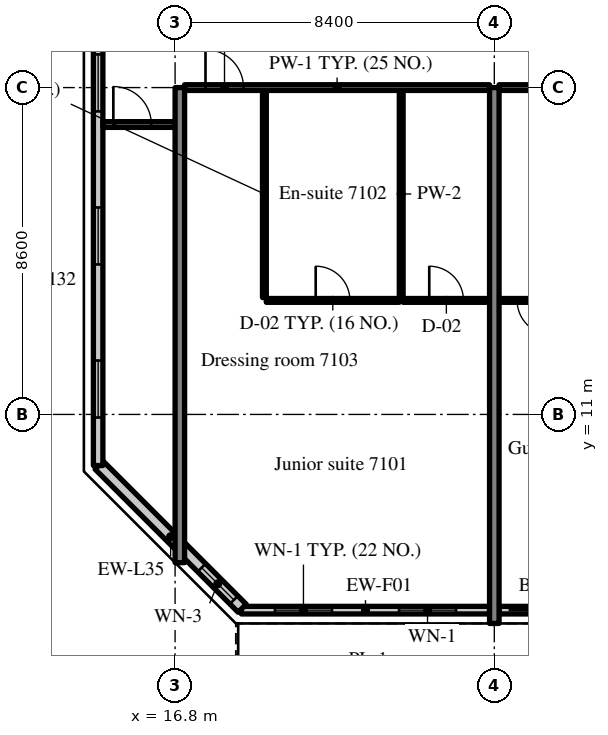
"""IFC4 building model, lengths in metres.
Left out: names, types, materials, properties, quantities, classifications, styles, units other than length and angle.
Written with IfcOpenShell. Run it as: python <this file> out.ifc"""

import sys

from ifc_helpers import new_model, si_unit, direction, frame, frame_2d, origin, place, context, subcontext, project, spatial, rectangle, extrude, source, transform, mapped, element, fill, save


model = new_model("IFC4")
c1 = context("Model", 3, precision=1e-05, world=origin(), true_north=direction((0.0, 1.0)))
c2 = subcontext(c1, "Body", "Model", "MODEL_VIEW")
j1 = project(units=[si_unit("LENGTHUNIT", "METRE"), si_unit("PLANEANGLEUNIT", "RADIAN")], contexts=[c1])
p1 = place(None, origin())
s1 = spatial("IfcSite", under=j1, at=p1, CompositionType="ELEMENT")
p2 = place(p1, origin())
s2 = spatial("IfcBuilding", under=s1, at=p2, CompositionType="ELEMENT")
p3 = place(p2, frame((0.0, 0.0, 297.7)))
s3 = spatial("IfcBuildingStorey", under=s2, at=p3, CompositionType="ELEMENT", Elevation=297.7)
m1 = source(origin(), c2, "Body", "SweptSolid", [
    extrude(rectangle(XDim=12.5, YDim=0.25, at=frame_2d((6.25, 0.0))), origin(), (0.0, 0.0, 1.0), 3.72),
])
p4 = place(p3, frame((16.925, 7.1, 0.0), z_axis=(0.0, 0.0, 1.0), x_axis=(0.0, 1.0, 0.0)))
e1 = element("IfcWall", 1, at=p4, inside=s3, PredefinedType="SHEAR", context=c2, shape_type="MappedRepresentation", body=[
    mapped(m1, transform((0.0, 0.0, 0.0), scale=1.0)),
])
m2 = source(origin(), c2, "Body", "SweptSolid", [
    extrude(rectangle(XDim=14.1, YDim=0.25, at=frame_2d((7.05, 0.0))), origin(), (0.0, 0.0, 1.0), 3.72),
])
p5 = place(p3, frame((25.2, 5.5, 0.0), z_axis=(0.0, 0.0, 1.0), x_axis=(0.0, 1.0, 0.0)))
e2 = element("IfcWall", 2, at=p5, inside=s3, PredefinedType="SHEAR", context=c2, shape_type="MappedRepresentation", body=[
    mapped(m2, transform((0.0, 0.0, 0.0), scale=1.0)),
])
m3 = source(origin(), c2, "Body", "SweptSolid", [
    extrude(rectangle(XDim=6.53, YDim=0.2, at=frame_2d((3.265, 0.0))), origin(), (0.0, 0.0, 1.0), 3.17),
])
p6 = place(p3, frame((18.545, 5.85, 0.0), z_axis=(0.0, 0.0, 1.0), x_axis=(1.0, 0.0, 0.0)))
e3 = element("IfcWall", 3, at=p6, inside=s3, PredefinedType="SOLIDWALL", context=c2, shape_type="MappedRepresentation", body=[
    mapped(m3, transform((0.0, 0.0, 0.0), scale=1.0)),
])
m4 = source(origin(), c2, "Body", "SweptSolid", [
    extrude(rectangle(XDim=1.5, YDim=1.5, at=frame_2d((0.75, 0.75))), frame((0.0, 0.11, 0.0), z_axis=(0.0, -1.0, 0.0), x_axis=(1.0, 0.0, 0.0)), (0.0, 0.0, 1.0), 0.22),
])
p7 = place(p6, frame((0.883, 0.0, 0.9)))
e4 = element("IfcOpeningElement", 4, at=p7, cuts=e3, PredefinedType="OPENING", context=c2, shape_type="MappedRepresentation", body=[
    mapped(m4, transform((0.0, 0.0, 0.0), scale=1.0)),
])
p8 = place(p6, frame((4.147, 0.0, 0.9)))
e5 = element("IfcOpeningElement", 5, at=p8, cuts=e3, PredefinedType="OPENING", context=c2, shape_type="MappedRepresentation", body=[
    mapped(m4, transform((0.0, 0.0, 0.0), scale=1.0)),
])
m5 = source(origin(), c2, "Body", "SweptSolid", [
    extrude(rectangle(XDim=8.15, YDim=0.2, at=frame_2d((4.075, 0.0))), origin(), (0.0, 0.0, 1.0), 3.17),
])
p9 = place(p3, frame((25.325, 5.85, 0.0), z_axis=(0.0, 0.0, 1.0), x_axis=(1.0, 0.0, 0.0)))
e6 = element("IfcWall", 6, at=p9, inside=s3, PredefinedType="SOLIDWALL", context=c2, shape_type="MappedRepresentation", body=[
    mapped(m5, transform((0.0, 0.0, 0.0), scale=1.0)),
])
m6 = source(origin(), c2, "Body", "SweptSolid", [
    extrude(rectangle(XDim=1.2, YDim=2.4, at=frame_2d((0.6, 1.2))), frame((0.0, 0.11, 0.0), z_axis=(0.0, -1.0, 0.0), x_axis=(1.0, 0.0, 0.0)), (0.0, 0.0, 1.0), 0.22),
])
p10 = place(p9, frame((0.25, 0.0, 0.0)))
e7 = element("IfcOpeningElement", 7, at=p10, cuts=e6, PredefinedType="OPENING", context=c2, shape_type="MappedRepresentation", body=[
    mapped(m6, transform((0.0, 0.0, 0.0), scale=1.0)),
])
p11 = place(p9, frame((2.325, 0.0, 0.9)))
e8 = element("IfcOpeningElement", 8, at=p11, cuts=e6, PredefinedType="OPENING", context=c2, shape_type="MappedRepresentation", body=[
    mapped(m4, transform((0.0, 0.0, 0.0), scale=1.0)),
])
p12 = place(p9, frame((4.325, 0.0, 0.0)))
e9 = element("IfcOpeningElement", 9, at=p12, cuts=e6, PredefinedType="OPENING", context=c2, shape_type="MappedRepresentation", body=[
    mapped(m6, transform((0.0, 0.0, 0.0), scale=1.0)),
])
p13 = place(p9, frame((6.4, 0.0, 0.9)))
e10 = element("IfcOpeningElement", 10, at=p13, cuts=e6, PredefinedType="OPENING", context=c2, shape_type="MappedRepresentation", body=[
    mapped(m4, transform((0.0, 0.0, 0.0), scale=1.0)),
])
m7 = source(origin(), c2, "Body", "SweptSolid", [
    extrude(rectangle(XDim=5.326, YDim=0.3, at=frame_2d((2.663, 0.0))), origin(), (0.0, 0.0, 1.0), 3.72),
])
p14 = place(p3, frame((14.8, 9.666, 0.0), z_axis=(0.0, 0.0, 1.0), x_axis=(0.707083859269, -0.707129702361, 0.0)))
e11 = element("IfcWall", 11, at=p14, inside=s3, PredefinedType="SOLIDWALL", context=c2, shape_type="MappedRepresentation", body=[
    mapped(m7, transform((0.0, 0.0, 0.0), scale=1.0)),
])
m8 = source(origin(), c2, "Body", "SweptSolid", [
    extrude(rectangle(XDim=1.2, YDim=1.5, at=frame_2d((0.6, 0.75))), frame((0.0, 0.16, 0.0), z_axis=(0.0, -1.0, 0.0), x_axis=(1.0, 0.0, 0.0)), (0.0, 0.0, 1.0), 0.32),
])
p15 = place(p14, frame((3.815, 0.0, 0.9)))
e12 = element("IfcOpeningElement", 12, at=p15, cuts=e11, PredefinedType="OPENING", context=c2, shape_type="MappedRepresentation", body=[
    mapped(m8, transform((0.0, 0.0, 0.0), scale=1.0)),
])
m9 = source(origin(), c2, "Body", "SweptSolid", [
    extrude(rectangle(XDim=28.189, YDim=0.25, at=frame_2d((14.095, 0.0))), origin(), (0.0, 0.0, 1.0), 3.72),
])
p16 = place(p3, frame((14.775, 37.845, 0.0), z_axis=(0.0, 0.0, 1.0), x_axis=(0.0, -1.0, 0.0)))
e13 = element("IfcWall", 13, at=p16, inside=s3, PredefinedType="SOLIDWALL", context=c2, shape_type="MappedRepresentation", body=[
    mapped(m9, transform((0.0, 0.0, 0.0), scale=1.0)),
])
m10 = source(origin(), c2, "Body", "SweptSolid", [
    extrude(rectangle(XDim=1.5, YDim=1.5, at=frame_2d((0.75, 0.75))), frame((0.0, 0.135, 0.0), z_axis=(0.0, -1.0, 0.0), x_axis=(1.0, 0.0, 0.0)), (0.0, 0.0, 1.0), 0.27),
])
p17 = place(p16, frame((1.263, 0.0, 0.9)))
e14 = element("IfcOpeningElement", 14, at=p17, cuts=e13, PredefinedType="OPENING", context=c2, shape_type="MappedRepresentation", body=[
    mapped(m10, transform((0.0, 0.0, 0.0), scale=1.0)),
])
p18 = place(p16, frame((5.291, 0.0, 0.9)))
e15 = element("IfcOpeningElement", 15, at=p18, cuts=e13, PredefinedType="OPENING", context=c2, shape_type="MappedRepresentation", body=[
    mapped(m10, transform((0.0, 0.0, 0.0), scale=1.0)),
])
p19 = place(p16, frame((9.318, 0.0, 0.9)))
e16 = element("IfcOpeningElement", 16, at=p19, cuts=e13, PredefinedType="OPENING", context=c2, shape_type="MappedRepresentation", body=[
    mapped(m10, transform((0.0, 0.0, 0.0), scale=1.0)),
])
p20 = place(p16, frame((13.345, 0.0, 0.9)))
e17 = element("IfcOpeningElement", 17, at=p20, cuts=e13, PredefinedType="OPENING", context=c2, shape_type="MappedRepresentation", body=[
    mapped(m10, transform((0.0, 0.0, 0.0), scale=1.0)),
])
p21 = place(p16, frame((17.372, 0.0, 0.9)))
e18 = element("IfcOpeningElement", 18, at=p21, cuts=e13, PredefinedType="OPENING", context=c2, shape_type="MappedRepresentation", body=[
    mapped(m10, transform((0.0, 0.0, 0.0), scale=1.0)),
])
p22 = place(p16, frame((21.399, 0.0, 0.9)))
e19 = element("IfcOpeningElement", 19, at=p22, cuts=e13, PredefinedType="OPENING", context=c2, shape_type="MappedRepresentation", body=[
    mapped(m10, transform((0.0, 0.0, 0.0), scale=1.0)),
])
p23 = place(p16, frame((25.426, 0.0, 0.9)))
e20 = element("IfcOpeningElement", 20, at=p23, cuts=e13, PredefinedType="OPENING", context=c2, shape_type="MappedRepresentation", body=[
    mapped(m10, transform((0.0, 0.0, 0.0), scale=1.0)),
])
m11 = source(origin(), c2, "Body", "SweptSolid", [
    extrude(rectangle(XDim=5.45, YDim=0.1, at=frame_2d((2.725, 0.0))), origin(), (0.0, 0.0, 1.0), 3.72),
])
for number, where, z_axis, x_axis in (
    (21, (19.15, 14.075, 0.0), (0.0, 0.0, 1.0), (0.0, 1.0, 0.0)),
    (22, (22.75, 14.075, 0.0), (0.0, 0.0, 1.0), (0.0, 1.0, 0.0)),
):
    element("IfcWall", number, at=place(p3, frame(where, z_axis=z_axis, x_axis=x_axis)), inside=s3, PredefinedType="PARTITIONING", context=c2, shape_type="MappedRepresentation", body=[
        mapped(m11, transform((0.0, 0.0, 0.0), scale=1.0)),
    ])
m12 = source(origin(), c2, "Body", "SweptSolid", [
    extrude(rectangle(XDim=3.5, YDim=0.1, at=frame_2d((1.75, 0.0))), origin(), (0.0, 0.0, 1.0), 3.72),
])
p24 = place(p3, frame((19.2, 14.0, 0.0), z_axis=(0.0, 0.0, 1.0), x_axis=(1.0, 0.0, 0.0)))
e23 = element("IfcWall", 23, at=p24, inside=s3, PredefinedType="PARTITIONING", context=c2, shape_type="MappedRepresentation", body=[
    mapped(m12, transform((0.0, 0.0, 0.0), scale=1.0)),
])
m13 = source(origin(), c2, "Body", "SweptSolid", [
    extrude(rectangle(XDim=0.9, YDim=2.1, at=frame_2d((0.45, 1.05))), frame((0.0, 0.06, 0.0), z_axis=(0.0, -1.0, 0.0), x_axis=(1.0, 0.0, 0.0)), (0.0, 0.0, 1.0), 0.12),
])
p25 = place(p24, frame((1.3, 0.0, 0.0)))
e24 = element("IfcOpeningElement", 24, at=p25, cuts=e23, PredefinedType="OPENING", context=c2, shape_type="MappedRepresentation", body=[
    mapped(m13, transform((0.0, 0.0, 0.0), scale=1.0)),
])
m14 = source(origin(), c2, "Body", "SweptSolid", [
    extrude(rectangle(XDim=2.275, YDim=0.1, at=frame_2d((1.137, 0.0))), origin(), (0.0, 0.0, 1.0), 3.72),
])
p26 = place(p3, frame((22.8, 14.0, 0.0), z_axis=(0.0, 0.0, 1.0), x_axis=(1.0, 0.0, 0.0)))
e25 = element("IfcWall", 25, at=p26, inside=s3, PredefinedType="PARTITIONING", context=c2, shape_type="MappedRepresentation", body=[
    mapped(m14, transform((0.0, 0.0, 0.0), scale=1.0)),
])
p27 = place(p26, frame((0.688, 0.0, 0.0)))
e26 = element("IfcOpeningElement", 26, at=p27, cuts=e25, PredefinedType="OPENING", context=c2, shape_type="MappedRepresentation", body=[
    mapped(m13, transform((0.0, 0.0, 0.0), scale=1.0)),
])
m15 = source(origin(), c2, "Body", "SweptSolid", [
    extrude(rectangle(XDim=8.025, YDim=0.15, at=frame_2d((4.012, 0.0))), origin(), (0.0, 0.0, 1.0), 3.02),
])
p28 = place(p3, frame((17.05, 19.6, 0.0), z_axis=(0.0, 0.0, 1.0), x_axis=(1.0, 0.0, 0.0)))
e27 = element("IfcWall", 27, at=p28, inside=s3, PredefinedType="PARTITIONING", context=c2, shape_type="MappedRepresentation", body=[
    mapped(m15, transform((0.0, 0.0, 0.0), scale=1.0)),
])
m16 = source(origin(), c2, "Body", "SweptSolid", [
    extrude(rectangle(XDim=1.0, YDim=2.1, at=frame_2d((0.5, 1.05))), frame((0.0, 0.085, 0.0), z_axis=(0.0, -1.0, 0.0), x_axis=(1.0, 0.0, 0.0)), (0.0, 0.0, 1.0), 0.17),
])
p29 = place(p28, frame((0.55, 0.0, 0.0)))
e28 = element("IfcOpeningElement", 28, at=p29, cuts=e27, PredefinedType="OPENING", context=c2, shape_type="MappedRepresentation", body=[
    mapped(m16, transform((0.0, 0.0, 0.0), scale=1.0)),
])
m17 = source(origin(), c2, "Body", "SweptSolid", [
    extrude(rectangle(XDim=1.85, YDim=0.1, at=frame_2d((0.925, 0.0))), origin(), (0.0, 0.0, 1.0), 3.72),
])
p30 = place(p3, frame((25.325, 14.0, 0.0), z_axis=(0.0, 0.0, 1.0), x_axis=(1.0, 0.0, 0.0)))
e29 = element("IfcWall", 29, at=p30, inside=s3, PredefinedType="PARTITIONING", context=c2, shape_type="MappedRepresentation", body=[
    mapped(m17, transform((0.0, 0.0, 0.0), scale=1.0)),
])
p31 = place(p30, frame((0.475, 0.0, 0.0)))
e30 = element("IfcOpeningElement", 30, at=p31, cuts=e29, PredefinedType="OPENING", context=c2, shape_type="MappedRepresentation", body=[
    mapped(m13, transform((0.0, 0.0, 0.0), scale=1.0)),
])
m18 = source(origin(), c2, "Body", "SweptSolid", [
    extrude(rectangle(XDim=4.0, YDim=0.15, at=frame_2d((2.0, 0.0))), origin(), (0.0, 0.0, 1.0), 3.02),
])
p32 = place(p3, frame((25.325, 19.6, 0.0), z_axis=(0.0, 0.0, 1.0), x_axis=(1.0, 0.0, 0.0)))
e31 = element("IfcWall", 31, at=p32, inside=s3, PredefinedType="PARTITIONING", context=c2, shape_type="MappedRepresentation", body=[
    mapped(m18, transform((0.0, 0.0, 0.0), scale=1.0)),
])
p33 = place(p32, frame((2.45, 0.0, 0.0)))
e32 = element("IfcOpeningElement", 32, at=p33, cuts=e31, PredefinedType="OPENING", context=c2, shape_type="MappedRepresentation", body=[
    mapped(m16, transform((0.0, 0.0, 0.0), scale=1.0)),
])
m19 = source(origin(), c2, "Body", "SweptSolid", [
    extrude(rectangle(XDim=1.9, YDim=0.15, at=frame_2d((0.95, 0.0))), origin(), (0.0, 0.0, 1.0), 3.02),
])
p34 = place(p3, frame((14.9, 18.628, 0.0), z_axis=(0.0, 0.0, 1.0), x_axis=(1.0, 0.0, 0.0)))
e33 = element("IfcWall", 33, at=p34, inside=s3, PredefinedType="PARTITIONING", context=c2, shape_type="MappedRepresentation", body=[
    mapped(m19, transform((0.0, 0.0, 0.0), scale=1.0)),
])
p35 = place(p34, frame((0.275, 0.0, 0.0)))
e34 = element("IfcOpeningElement", 34, at=p35, cuts=e33, PredefinedType="OPENING", context=c2, shape_type="MappedRepresentation", body=[
    mapped(m16, transform((0.0, 0.0, 0.0), scale=1.0)),
])
m20 = source(origin(), c2, "Body", "SweptSolid", [
    extrude(rectangle(XDim=1.5, YDim=1.5, at=frame_2d((0.75, 0.75))), frame((0.0, 0.03, 0.0), z_axis=(0.0, -1.0, 0.0), x_axis=(1.0, 0.0, 0.0)), (0.0, 0.0, 1.0), 0.06),
])
p36 = place(p7, origin())
e35 = element("IfcWindow", 35, at=p36, inside=s3, PartitioningType="SINGLE_PANEL", PredefinedType="WINDOW", context=c2, shape_type="MappedRepresentation", body=[
    mapped(m20, transform((0.0, 0.0, 0.0), scale=1.0)),
])
fill(e4, e35)
p37 = place(p8, origin())
e36 = element("IfcWindow", 36, at=p37, inside=s3, PartitioningType="SINGLE_PANEL", PredefinedType="WINDOW", context=c2, shape_type="MappedRepresentation", body=[
    mapped(m20, transform((0.0, 0.0, 0.0), scale=1.0)),
])
fill(e5, e36)
m21 = source(origin(), c2, "Body", "SweptSolid", [
    extrude(rectangle(XDim=1.2, YDim=2.4, at=frame_2d((0.6, 1.2))), frame((0.0, 0.025, 0.0), z_axis=(0.0, -1.0, 0.0), x_axis=(1.0, 0.0, 0.0)), (0.0, 0.0, 1.0), 0.05),
])
p38 = place(p10, origin())
e37 = element("IfcDoor", 37, at=p38, inside=s3, OperationType="SLIDING_TO_LEFT", PredefinedType="DOOR", context=c2, shape_type="MappedRepresentation", body=[
    mapped(m21, transform((0.0, 0.0, 0.0), scale=1.0)),
])
fill(e7, e37)
m22 = source(origin(), c2, "Body", "SweptSolid", [
    extrude(rectangle(XDim=1.2, YDim=1.5, at=frame_2d((0.6, 0.75))), frame((0.0, 0.03, 0.0), z_axis=(0.0, -1.0, 0.0), x_axis=(1.0, 0.0, 0.0)), (0.0, 0.0, 1.0), 0.06),
])
p39 = place(p15, origin())
e38 = element("IfcWindow", 38, at=p39, inside=s3, PartitioningType="SINGLE_PANEL", PredefinedType="WINDOW", context=c2, shape_type="MappedRepresentation", body=[
    mapped(m22, transform((0.0, 0.0, 0.0), scale=1.0)),
])
fill(e12, e38)
p40 = place(p21, origin())
e39 = element("IfcWindow", 39, at=p40, inside=s3, PartitioningType="SINGLE_PANEL", PredefinedType="WINDOW", context=c2, shape_type="MappedRepresentation", body=[
    mapped(m20, transform((0.0, 0.0, 0.0), scale=1.0)),
])
fill(e18, e39)
p41 = place(p22, origin())
e40 = element("IfcWindow", 40, at=p41, inside=s3, PartitioningType="SINGLE_PANEL", PredefinedType="WINDOW", context=c2, shape_type="MappedRepresentation", body=[
    mapped(m20, transform((0.0, 0.0, 0.0), scale=1.0)),
])
fill(e19, e40)
p42 = place(p23, origin())
e41 = element("IfcWindow", 41, at=p42, inside=s3, PartitioningType="SINGLE_PANEL", PredefinedType="WINDOW", context=c2, shape_type="MappedRepresentation", body=[
    mapped(m20, transform((0.0, 0.0, 0.0), scale=1.0)),
])
fill(e20, e41)
m23 = source(origin(), c2, "Body", "SweptSolid", [
    extrude(rectangle(XDim=0.9, YDim=2.1, at=frame_2d((0.45, 1.05))), frame((0.0, 0.025, 0.0), z_axis=(0.0, -1.0, 0.0), x_axis=(1.0, 0.0, 0.0)), (0.0, 0.0, 1.0), 0.05),
])
p43 = place(p25, origin())
e42 = element("IfcDoor", 42, at=p43, inside=s3, OperationType="SINGLE_SWING_LEFT", PredefinedType="DOOR", context=c2, shape_type="MappedRepresentation", body=[
    mapped(m23, transform((0.0, 0.0, 0.0), scale=1.0)),
])
fill(e24, e42)
p44 = place(p27, origin())
e43 = element("IfcDoor", 43, at=p44, inside=s3, OperationType="SINGLE_SWING_LEFT", PredefinedType="DOOR", context=c2, shape_type="MappedRepresentation", body=[
    mapped(m23, transform((0.0, 0.0, 0.0), scale=1.0)),
])
fill(e26, e43)
m24 = source(origin(), c2, "Body", "SweptSolid", [
    extrude(rectangle(XDim=1.0, YDim=2.1, at=frame_2d((0.5, 1.05))), frame((0.0, 0.025, 0.0), z_axis=(0.0, -1.0, 0.0), x_axis=(1.0, 0.0, 0.0)), (0.0, 0.0, 1.0), 0.05),
])
p45 = place(p29, origin())
e44 = element("IfcDoor", 44, at=p45, inside=s3, OperationType="SINGLE_SWING_LEFT", PredefinedType="DOOR", context=c2, shape_type="MappedRepresentation", body=[
    mapped(m24, transform((0.0, 0.0, 0.0), scale=1.0)),
])
fill(e28, e44)
p46 = place(p31, origin())
e45 = element("IfcDoor", 45, at=p46, inside=s3, OperationType="SINGLE_SWING_RIGHT", PredefinedType="DOOR", context=c2, shape_type="MappedRepresentation", body=[
    mapped(m23, transform((0.0, 0.0, 0.0), scale=1.0)),
])
fill(e30, e45)
p47 = place(p35, origin())
e46 = element("IfcDoor", 46, at=p47, inside=s3, OperationType="SINGLE_SWING_LEFT", PredefinedType="DOOR", context=c2, shape_type="MappedRepresentation", body=[
    mapped(m24, transform((0.0, 0.0, 0.0), scale=1.0)),
])
fill(e34, e46)
save(model, sys.argv[1])
